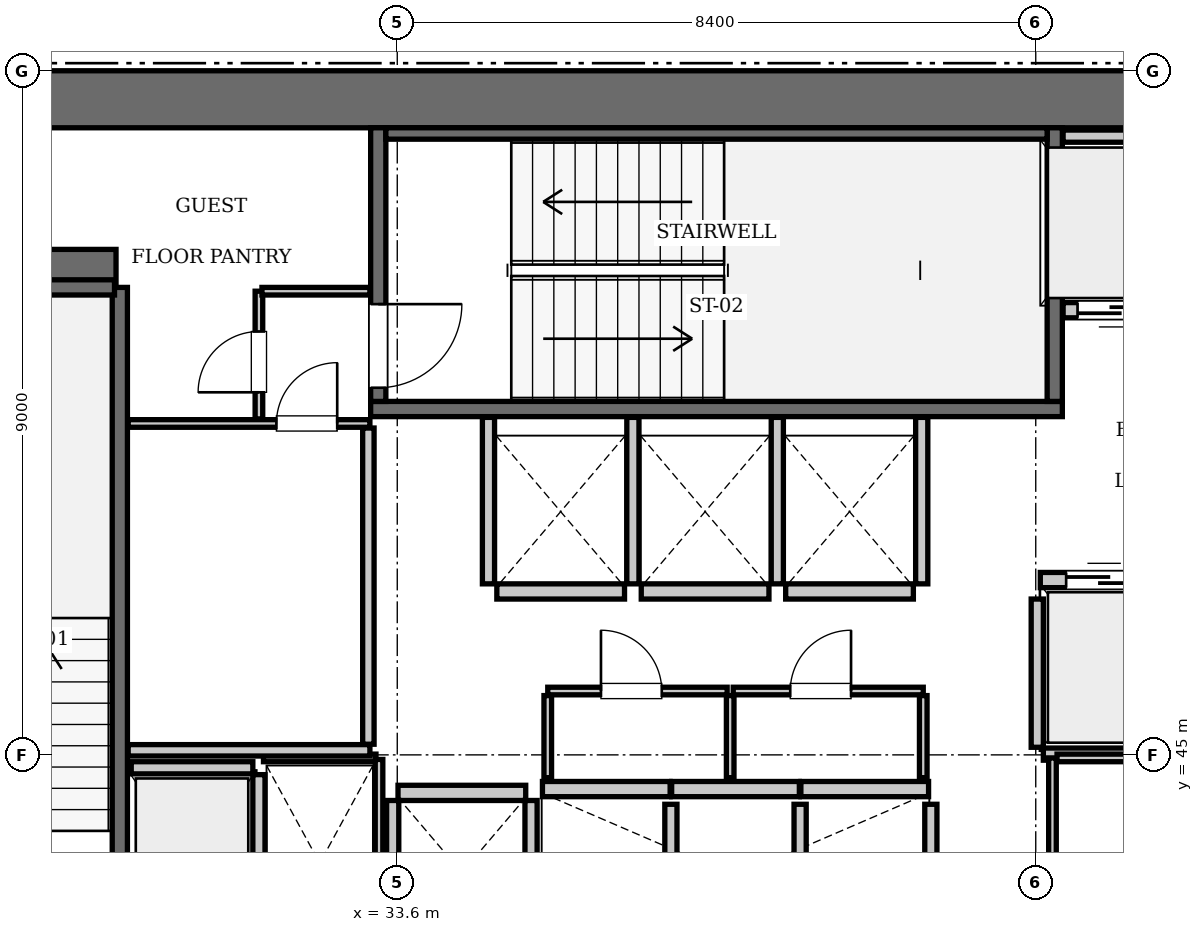
"""IFC4 building model, lengths in metres.
Left out: names, types, materials, properties, quantities, classifications, styles, units other than length and angle.
Written with IfcOpenShell. Run it as: python <this file> out.ifc"""

import sys

from ifc_helpers import new_model, si_unit, direction, frame, frame_2d, origin, place, context, subcontext, project, spatial, rectangle, extrude, element, fill, save


model = new_model("IFC4")
c1 = context("Model", 3, precision=1e-05, world=origin(), true_north=direction((0.0, 1.0)))
c2 = subcontext(c1, "Body", "Model", "MODEL_VIEW")
j1 = project(units=[si_unit("LENGTHUNIT", "METRE"), si_unit("PLANEANGLEUNIT", "RADIAN")], contexts=[c1])
p1 = place(None, origin())
s1 = spatial("IfcSite", under=j1, at=p1, CompositionType="ELEMENT")
p2 = place(p1, origin())
s2 = spatial("IfcBuilding", under=s1, at=p2, CompositionType="ELEMENT")
p3 = place(p2, frame((0.0, 0.0, 204.4)))
s3 = spatial("IfcBuildingStorey", under=s2, at=p3, CompositionType="ELEMENT", Elevation=204.4)
p4 = place(p3, frame((25.2, 53.625, 0.0), z_axis=(0.0, 0.0, 1.0), x_axis=(1.0, 0.0, 0.0)))
e1 = element("IfcWall", 1, at=p4, inside=s3, PredefinedType="SHEAR", context=c2, shape_type="SweptSolid", body=[
    extrude(rectangle(XDim=25.2, YDim=0.75, at=frame_2d((12.6, 0.0))), origin(), (0.0, 0.0, 1.0), 3.85),
])
p5 = place(p3, frame((25.95, 51.4, 0.0), z_axis=(0.0, 0.0, 1.0), x_axis=(1.0, 0.0, 0.0)))
e2 = element("IfcWall", 2, at=p5, inside=s3, PredefinedType="SHEAR", context=c2, shape_type="SweptSolid", body=[
    extrude(rectangle(XDim=3.95, YDim=0.5, at=frame_2d((1.975, 0.0))), origin(), (0.0, 0.0, 1.0), 3.85),
])
p6 = place(p3, frame((29.95, 42.15, 0.0), z_axis=(0.0, 0.0, 1.0), x_axis=(0.0, 1.0, 0.0)))
e3 = element("IfcWall", 3, at=p6, inside=s3, PredefinedType="SOLIDWALL", context=c2, shape_type="SweptSolid", body=[
    extrude(rectangle(XDim=9.0, YDim=0.2, at=frame_2d((4.5, 0.0))), origin(), (0.0, 0.0, 1.0), 3.61),
])
p7 = place(p3, frame((26.38, 51.15, 0.0), z_axis=(0.0, 0.0, 1.0), x_axis=(1.0, 0.0, 0.0)))
e4 = element("IfcWall", 4, at=p7, inside=s3, PredefinedType="SOLIDWALL", context=c2, shape_type="SweptSolid", body=[
    extrude(rectangle(XDim=3.5, YDim=0.2, at=frame_2d((1.75, 0.0))), origin(), (0.0, 0.0, 1.0), 3.61),
])
p8 = place(p3, frame((33.25, 49.55, 0.0), z_axis=(0.0, 0.0, 1.0), x_axis=(1.0, 0.0, 0.0)))
e5 = element("IfcWall", 5, at=p8, inside=s3, PredefinedType="SOLIDWALL", context=c2, shape_type="SweptSolid", body=[
    extrude(rectangle(XDim=9.1, YDim=0.2, at=frame_2d((4.55, 0.0))), origin(), (0.0, 0.0, 1.0), 3.61),
])
p9 = place(p3, frame((42.25, 49.65, 0.0), z_axis=(0.0, 0.0, 1.0), x_axis=(0.0, 1.0, 0.0)))
e6 = element("IfcWall", 6, at=p9, inside=s3, PredefinedType="SOLIDWALL", context=c2, shape_type="SweptSolid", body=[
    extrude(rectangle(XDim=3.6, YDim=0.2, at=frame_2d((1.8, 0.0))), origin(), (0.0, 0.0, 1.0), 3.61),
])
p10 = place(p3, frame((33.35, 49.65, 0.0), z_axis=(0.0, 0.0, 1.0), x_axis=(0.0, 1.0, 0.0)))
e7 = element("IfcWall", 7, at=p10, inside=s3, PredefinedType="SOLIDWALL", context=c2, shape_type="SweptSolid", body=[
    extrude(rectangle(XDim=3.6, YDim=0.2, at=frame_2d((1.8, 0.0))), origin(), (0.0, 0.0, 1.0), 3.61),
])
p11 = place(p10, frame((0.18, 0.0, 0.0)))
e8 = element("IfcOpeningElement", 8, at=p11, cuts=e7, PredefinedType="OPENING", context=c2, shape_type="SweptSolid", body=[
    extrude(rectangle(XDim=1.1, YDim=2.15, at=frame_2d((0.55, 1.075))), frame((0.0, 0.11, 0.0), z_axis=(0.0, -1.0, 0.0), x_axis=(1.0, 0.0, 0.0)), (0.0, 0.0, 1.0), 0.22),
])
p12 = place(p3, frame((33.45, 53.175, 0.0), z_axis=(0.0, 0.0, 1.0), x_axis=(1.0, 0.0, 0.0)))
e9 = element("IfcWall", 9, at=p12, inside=s3, PredefinedType="SOLIDWALL", context=c2, shape_type="SweptSolid", body=[
    extrude(rectangle(XDim=8.7, YDim=0.15, at=frame_2d((4.35, 0.0))), origin(), (0.0, 0.0, 1.0), 3.61),
])
p13 = place(p3, frame((42.06, 47.3, 0.0), z_axis=(0.0, 0.0, 1.0), x_axis=(1.0, 0.0, 0.0)))
e10 = element("IfcWall", 10, at=p13, inside=s3, PredefinedType="SOLIDWALL", context=c2, shape_type="SweptSolid", body=[
    extrude(rectangle(XDim=1.68, YDim=0.2, at=frame_2d((0.84, 0.0))), origin(), (0.0, 0.0, 1.0), 3.61),
])
p14 = place(p13, frame((0.34, 0.0, 0.0)))
e11 = element("IfcOpeningElement", 11, at=p14, cuts=e10, PredefinedType="OPENING", context=c2, shape_type="SweptSolid", body=[
    extrude(rectangle(XDim=1.0, YDim=2.15, at=frame_2d((0.5, 1.075))), frame((0.0, 0.11, 0.0), z_axis=(0.0, -1.0, 0.0), x_axis=(1.0, 0.0, 0.0)), (0.0, 0.0, 1.0), 0.22),
])
p15 = place(p3, frame((42.36, 50.85, 0.0), z_axis=(0.0, 0.0, 1.0), x_axis=(1.0, 0.0, 0.0)))
e12 = element("IfcWall", 12, at=p15, inside=s3, PredefinedType="SOLIDWALL", context=c2, shape_type="SweptSolid", body=[
    extrude(rectangle(XDim=1.38, YDim=0.2, at=frame_2d((0.69, 0.0))), origin(), (0.0, 0.0, 1.0), 3.61),
])
p16 = place(p15, frame((0.19, 0.0, 0.0)))
e13 = element("IfcOpeningElement", 13, at=p16, cuts=e12, PredefinedType="OPENING", context=c2, shape_type="SweptSolid", body=[
    extrude(rectangle(XDim=1.0, YDim=2.15, at=frame_2d((0.5, 1.075))), frame((0.0, 0.11, 0.0), z_axis=(0.0, -1.0, 0.0), x_axis=(1.0, 0.0, 0.0)), (0.0, 0.0, 1.0), 0.22),
])
for number, where, z_axis, x_axis in (
    (14, (35.51, 44.55, 0.0), (0.0, 0.0, 1.0), (1.0, 0.0, 0.0)),
    (15, (37.21, 44.55, 0.0), (0.0, 0.0, 1.0), (1.0, 0.0, 0.0)),
):
    element("IfcWall", number, at=place(p3, frame(where, z_axis=z_axis, x_axis=x_axis)), inside=s3, PredefinedType="SOLIDWALL", context=c2, shape_type="SweptSolid", body=[
        extrude(rectangle(XDim=1.68, YDim=0.2, at=frame_2d((0.84, 0.0))), origin(), (0.0, 0.0, 1.0), 3.61),
    ])
for number, where, z_axis, x_axis in (
    (16, (38.91, 44.55, 0.0), (0.0, 0.0, 1.0), (1.0, 0.0, 0.0)),
    (17, (34.91, 47.15, 0.0), (0.0, 0.0, 1.0), (1.0, 0.0, 0.0)),
):
    element("IfcWall", number, at=place(p3, frame(where, z_axis=z_axis, x_axis=x_axis)), inside=s3, PredefinedType="SOLIDWALL", context=c2, shape_type="SweptSolid", body=[
        extrude(rectangle(XDim=1.68, YDim=0.2, at=frame_2d((0.84, 0.0))), origin(), (0.0, 0.0, 1.0), 3.61),
    ])
for number, where, z_axis, x_axis in (
    (18, (36.81, 47.15, 0.0), (0.0, 0.0, 1.0), (1.0, 0.0, 0.0)),
    (19, (38.71, 47.15, 0.0), (0.0, 0.0, 1.0), (1.0, 0.0, 0.0)),
    (20, (33.61, 44.5, 0.0), (0.0, 0.0, 1.0), (1.0, 0.0, 0.0)),
):
    element("IfcWall", number, at=place(p3, frame(where, z_axis=z_axis, x_axis=x_axis)), inside=s3, PredefinedType="SOLIDWALL", context=c2, shape_type="SweptSolid", body=[
        extrude(rectangle(XDim=1.68, YDim=0.2, at=frame_2d((0.84, 0.0))), origin(), (0.0, 0.0, 1.0), 3.61),
    ])
p17 = place(p3, frame((30.1, 44.83, 0.0), z_axis=(0.0, 0.0, 1.0), x_axis=(1.0, 0.0, 0.0)))
e21 = element("IfcWall", 21, at=p17, inside=s3, PredefinedType="SOLIDWALL", context=c2, shape_type="SweptSolid", body=[
    extrude(rectangle(XDim=1.6, YDim=0.16, at=frame_2d((0.8, 0.0))), origin(), (0.0, 0.0, 1.0), 3.61),
])
p18 = place(p3, frame((31.78, 42.15, 0.0), z_axis=(0.0, 0.0, 1.0), x_axis=(0.0, 1.0, 0.0)))
e22 = element("IfcWall", 22, at=p18, inside=s3, PredefinedType="SOLIDWALL", context=c2, shape_type="SweptSolid", body=[
    extrude(rectangle(XDim=2.59, YDim=0.16, at=frame_2d((1.295, 0.0))), origin(), (0.0, 0.0, 1.0), 3.61),
])
p19 = place(p3, frame((42.02, 45.1, 0.0), z_axis=(0.0, 0.0, 1.0), x_axis=(0.0, 1.0, 0.0)))
e23 = element("IfcWall", 23, at=p19, inside=s3, PredefinedType="SOLIDWALL", context=c2, shape_type="SweptSolid", body=[
    extrude(rectangle(XDim=1.95, YDim=0.16, at=frame_2d((0.975, 0.0))), origin(), (0.0, 0.0, 1.0), 3.61),
])
p20 = place(p3, frame((42.1, 45.01, 0.0), z_axis=(0.0, 0.0, 1.0), x_axis=(1.0, 0.0, 0.0)))
e24 = element("IfcWall", 24, at=p20, inside=s3, PredefinedType="SOLIDWALL", context=c2, shape_type="SweptSolid", body=[
    extrude(rectangle(XDim=3.45, YDim=0.16, at=frame_2d((1.725, 0.0))), origin(), (0.0, 0.0, 1.0), 3.61),
])
p21 = place(p3, frame((42.36, 53.14, 0.0), z_axis=(0.0, 0.0, 1.0), x_axis=(1.0, 0.0, 0.0)))
e25 = element("IfcWall", 25, at=p21, inside=s3, PredefinedType="SOLIDWALL", context=c2, shape_type="SweptSolid", body=[
    extrude(rectangle(XDim=3.14, YDim=0.16, at=frame_2d((1.57, 0.0))), origin(), (0.0, 0.0, 1.0), 3.61),
])
for number, where, z_axis, x_axis in (
    (26, (37.2, 42.15, 0.0), (0.0, 0.0, 1.0), (0.0, 1.0, 0.0)),
    (27, (38.9, 42.15, 0.0), (0.0, 0.0, 1.0), (0.0, 1.0, 0.0)),
    (28, (40.62, 42.15, 0.0), (0.0, 0.0, 1.0), (0.0, 1.0, 0.0)),
):
    element("IfcWall", number, at=place(p3, frame(where, z_axis=z_axis, x_axis=x_axis)), inside=s3, PredefinedType="SOLIDWALL", context=c2, shape_type="SweptSolid", body=[
        extrude(rectangle(XDim=2.2, YDim=0.16, at=frame_2d((1.1, 0.0))), origin(), (0.0, 0.0, 1.0), 3.61),
    ])
for number, where, z_axis, x_axis in (
    (29, (34.8, 47.25, 0.0), (0.0, 0.0, 1.0), (0.0, 1.0, 0.0)),
    (30, (36.7, 47.25, 0.0), (0.0, 0.0, 1.0), (0.0, 1.0, 0.0)),
    (31, (38.6, 47.25, 0.0), (0.0, 0.0, 1.0), (0.0, 1.0, 0.0)),
    (32, (40.5, 47.25, 0.0), (0.0, 0.0, 1.0), (0.0, 1.0, 0.0)),
):
    element("IfcWall", number, at=place(p3, frame(where, z_axis=z_axis, x_axis=x_axis)), inside=s3, PredefinedType="SOLIDWALL", context=c2, shape_type="SweptSolid", body=[
        extrude(rectangle(XDim=2.19, YDim=0.16, at=frame_2d((1.095, 0.0))), origin(), (0.0, 0.0, 1.0), 3.61),
    ])
for number, where, z_axis, x_axis in (
    (33, (33.54, 42.15, 0.0), (0.0, 0.0, 1.0), (0.0, 1.0, 0.0)),
    (34, (35.36, 42.15, 0.0), (0.0, 0.0, 1.0), (0.0, 1.0, 0.0)),
):
    element("IfcWall", number, at=place(p3, frame(where, z_axis=z_axis, x_axis=x_axis)), inside=s3, PredefinedType="SOLIDWALL", context=c2, shape_type="SweptSolid", body=[
        extrude(rectangle(XDim=2.25, YDim=0.16, at=frame_2d((1.125, 0.0))), origin(), (0.0, 0.0, 1.0), 3.61),
    ])
p22 = place(p3, frame((31.84, 44.96, 0.0), z_axis=(0.0, 0.0, 1.0), x_axis=(1.0, 0.0, 0.0)))
e35 = element("IfcWall", 35, at=p22, inside=s3, PredefinedType="PARTITIONING", context=c2, shape_type="SweptSolid", body=[
    extrude(rectangle(XDim=1.48, YDim=0.1, at=frame_2d((0.74, 0.0))), origin(), (0.0, 0.0, 1.0), 3.61),
])
p23 = place(p3, frame((33.36, 42.21, 0.0), z_axis=(0.0, 0.0, 1.0), x_axis=(0.0, 1.0, 0.0)))
e36 = element("IfcWall", 36, at=p23, inside=s3, PredefinedType="PARTITIONING", context=c2, shape_type="SweptSolid", body=[
    extrude(rectangle(XDim=2.73, YDim=0.1, at=frame_2d((1.365, 0.0))), origin(), (0.0, 0.0, 1.0), 3.61),
])
p24 = place(p3, frame((35.58, 45.84, 0.0), z_axis=(0.0, 0.0, 1.0), x_axis=(1.0, 0.0, 0.0)))
e37 = element("IfcWall", 37, at=p24, inside=s3, PredefinedType="PARTITIONING", context=c2, shape_type="SweptSolid", body=[
    extrude(rectangle(XDim=2.36, YDim=0.1, at=frame_2d((1.18, 0.0))), origin(), (0.0, 0.0, 1.0), 3.61),
])
p25 = place(p24, frame((0.7, 0.0, 0.0)))
e38 = element("IfcOpeningElement", 38, at=p25, cuts=e37, PredefinedType="OPENING", context=c2, shape_type="SweptSolid", body=[
    extrude(rectangle(XDim=0.8, YDim=2.05, at=frame_2d((0.4, 1.025))), frame((0.0, 0.06, 0.0), z_axis=(0.0, -1.0, 0.0), x_axis=(1.0, 0.0, 0.0)), (0.0, 0.0, 1.0), 0.12),
])
p26 = place(p3, frame((38.02, 45.84, 0.0), z_axis=(0.0, 0.0, 1.0), x_axis=(1.0, 0.0, 0.0)))
e39 = element("IfcWall", 39, at=p26, inside=s3, PredefinedType="PARTITIONING", context=c2, shape_type="SweptSolid", body=[
    extrude(rectangle(XDim=2.5, YDim=0.1, at=frame_2d((1.25, 0.0))), origin(), (0.0, 0.0, 1.0), 3.61),
])
p27 = place(p26, frame((0.75, 0.0, 0.0)))
e40 = element("IfcOpeningElement", 40, at=p27, cuts=e39, PredefinedType="OPENING", context=c2, shape_type="SweptSolid", body=[
    extrude(rectangle(XDim=0.8, YDim=2.05, at=frame_2d((0.4, 1.025))), frame((0.0, 0.06, 0.0), z_axis=(0.0, -1.0, 0.0), x_axis=(1.0, 0.0, 0.0)), (0.0, 0.0, 1.0), 0.12),
])
for number, where, z_axis, x_axis in (
    (41, (35.58, 44.7, 0.0), (0.0, 0.0, 1.0), (0.0, 1.0, 0.0)),
    (42, (37.98, 44.7, 0.0), (0.0, 0.0, 1.0), (0.0, 1.0, 0.0)),
    (43, (40.52, 44.7, 0.0), (0.0, 0.0, 1.0), (0.0, 1.0, 0.0)),
):
    element("IfcWall", number, at=place(p3, frame(where, z_axis=z_axis, x_axis=x_axis)), inside=s3, PredefinedType="PARTITIONING", context=c2, shape_type="SweptSolid", body=[
        extrude(rectangle(XDim=1.08, YDim=0.1, at=frame_2d((0.54, 0.0))), origin(), (0.0, 0.0, 1.0), 3.61),
    ])
p28 = place(p3, frame((42.22, 42.2, 0.0), z_axis=(0.0, 0.0, 1.0), x_axis=(0.0, 1.0, 0.0)))
e44 = element("IfcWall", 44, at=p28, inside=s3, PredefinedType="PARTITIONING", context=c2, shape_type="SweptSolid", body=[
    extrude(rectangle(XDim=2.76, YDim=0.1, at=frame_2d((1.38, 0.0))), origin(), (0.0, 0.0, 1.0), 3.61),
])
p29 = place(p28, frame((0.65, 0.0, 0.0)))
e45 = element("IfcOpeningElement", 45, at=p29, cuts=e44, PredefinedType="OPENING", context=c2, shape_type="SweptSolid", body=[
    extrude(rectangle(XDim=0.8, YDim=2.05, at=frame_2d((0.4, 1.025))), frame((0.0, 0.06, 0.0), z_axis=(0.0, -1.0, 0.0), x_axis=(1.0, 0.0, 0.0)), (0.0, 0.0, 1.0), 0.12),
])
p30 = place(p3, frame((42.28, 44.96, 0.0), z_axis=(0.0, 0.0, 1.0), x_axis=(1.0, 0.0, 0.0)))
e46 = element("IfcWall", 46, at=p30, inside=s3, PredefinedType="PARTITIONING", context=c2, shape_type="SweptSolid", body=[
    extrude(rectangle(XDim=1.3, YDim=0.1, at=frame_2d((0.65, 0.0))), origin(), (0.0, 0.0, 1.0), 3.61),
])
p31 = place(p3, frame((30.06, 45.06, 0.0), z_axis=(0.0, 0.0, 1.0), x_axis=(1.0, 0.0, 0.0)))
e47 = element("IfcWall", 47, at=p31, inside=s3, PredefinedType="PARTITIONING", context=c2, shape_type="SweptSolid", body=[
    extrude(rectangle(XDim=3.18, YDim=0.15, at=frame_2d((1.59, 0.0))), origin(), (0.0, 0.0, 1.0), 3.61),
])
p32 = place(p3, frame((33.22, 45.14, 0.0), z_axis=(0.0, 0.0, 1.0), x_axis=(0.0, 1.0, 0.0)))
e48 = element("IfcWall", 48, at=p32, inside=s3, PredefinedType="PARTITIONING", context=c2, shape_type="SweptSolid", body=[
    extrude(rectangle(XDim=4.16, YDim=0.15, at=frame_2d((2.08, 0.0))), origin(), (0.0, 0.0, 1.0), 3.61),
])
p33 = place(p3, frame((30.06, 49.36, 0.0), z_axis=(0.0, 0.0, 1.0), x_axis=(1.0, 0.0, 0.0)))
e49 = element("IfcWall", 49, at=p33, inside=s3, PredefinedType="PARTITIONING", context=c2, shape_type="SweptSolid", body=[
    extrude(rectangle(XDim=3.18, YDim=0.1, at=frame_2d((1.59, 0.0))), origin(), (0.0, 0.0, 1.0), 3.61),
])
p34 = place(p33, frame((1.95, 0.0, 0.0)))
e50 = element("IfcOpeningElement", 50, at=p34, cuts=e49, PredefinedType="OPENING", context=c2, shape_type="SweptSolid", body=[
    extrude(rectangle(XDim=0.8, YDim=2.05, at=frame_2d((0.4, 1.025))), frame((0.0, 0.06, 0.0), z_axis=(0.0, -1.0, 0.0), x_axis=(1.0, 0.0, 0.0)), (0.0, 0.0, 1.0), 0.12),
])
p35 = place(p3, frame((31.78, 49.42, 0.0), z_axis=(0.0, 0.0, 1.0), x_axis=(0.0, 1.0, 0.0)))
e51 = element("IfcWall", 51, at=p35, inside=s3, PredefinedType="PARTITIONING", context=c2, shape_type="SweptSolid", body=[
    extrude(rectangle(XDim=1.68, YDim=0.1, at=frame_2d((0.84, 0.0))), origin(), (0.0, 0.0, 1.0), 3.61),
])
p36 = place(p35, frame((0.35, 0.0, 0.0)))
e52 = element("IfcOpeningElement", 52, at=p36, cuts=e51, PredefinedType="OPENING", context=c2, shape_type="SweptSolid", body=[
    extrude(rectangle(XDim=0.8, YDim=2.05, at=frame_2d((0.4, 1.025))), frame((0.0, 0.06, 0.0), z_axis=(0.0, -1.0, 0.0), x_axis=(1.0, 0.0, 0.0)), (0.0, 0.0, 1.0), 0.12),
])
p37 = place(p3, frame((31.82, 51.1, 0.0), z_axis=(0.0, 0.0, 1.0), x_axis=(1.0, 0.0, 0.0)))
e53 = element("IfcWall", 53, at=p37, inside=s3, PredefinedType="PARTITIONING", context=c2, shape_type="SweptSolid", body=[
    extrude(rectangle(XDim=1.42, YDim=0.1, at=frame_2d((0.71, 0.0))), origin(), (0.0, 0.0, 1.0), 3.61),
])
p38 = place(p11, frame((1.1, 0.0, 0.0), z_axis=(0.0, 0.0, 1.0), x_axis=(-1.0, 0.0, 0.0)))
e54 = element("IfcDoor", 54, at=p38, inside=s3, OperationType="SINGLE_SWING_LEFT", PredefinedType="DOOR", context=c2, shape_type="SweptSolid", body=[
    extrude(rectangle(XDim=1.1, YDim=2.15, at=frame_2d((0.55, 1.075))), frame((0.0, 0.025, 0.0), z_axis=(0.0, -1.0, 0.0), x_axis=(1.0, 0.0, 0.0)), (0.0, 0.0, 1.0), 0.05),
])
fill(e8, e54)
p39 = place(p14, origin())
e55 = element("IfcDoor", 55, at=p39, inside=s3, OperationType="SLIDING_TO_LEFT", PredefinedType="DOOR", context=c2, shape_type="SweptSolid", body=[
    extrude(rectangle(XDim=1.0, YDim=2.15, at=frame_2d((0.5, 1.075))), frame((0.0, 0.025, 0.0), z_axis=(0.0, -1.0, 0.0), x_axis=(1.0, 0.0, 0.0)), (0.0, 0.0, 1.0), 0.05),
])
fill(e11, e55)
p40 = place(p16, frame((1.0, 0.0, 0.0), z_axis=(0.0, 0.0, 1.0), x_axis=(-1.0, 0.0, 0.0)))
e56 = element("IfcDoor", 56, at=p40, inside=s3, OperationType="SLIDING_TO_LEFT", PredefinedType="DOOR", context=c2, shape_type="SweptSolid", body=[
    extrude(rectangle(XDim=1.0, YDim=2.15, at=frame_2d((0.5, 1.075))), frame((0.0, 0.025, 0.0), z_axis=(0.0, -1.0, 0.0), x_axis=(1.0, 0.0, 0.0)), (0.0, 0.0, 1.0), 0.05),
])
fill(e13, e56)
p41 = place(p25, origin())
e57 = element("IfcDoor", 57, at=p41, inside=s3, OperationType="SINGLE_SWING_LEFT", PredefinedType="DOOR", context=c2, shape_type="SweptSolid", body=[
    extrude(rectangle(XDim=0.8, YDim=2.05, at=frame_2d((0.4, 1.025))), frame((0.0, 0.025, 0.0), z_axis=(0.0, -1.0, 0.0), x_axis=(1.0, 0.0, 0.0)), (0.0, 0.0, 1.0), 0.05),
])
fill(e38, e57)
p42 = place(p27, origin())
e58 = element("IfcDoor", 58, at=p42, inside=s3, OperationType="SINGLE_SWING_RIGHT", PredefinedType="DOOR", context=c2, shape_type="SweptSolid", body=[
    extrude(rectangle(XDim=0.8, YDim=2.05, at=frame_2d((0.4, 1.025))), frame((0.0, 0.025, 0.0), z_axis=(0.0, -1.0, 0.0), x_axis=(1.0, 0.0, 0.0)), (0.0, 0.0, 1.0), 0.05),
])
fill(e40, e58)
p43 = place(p34, origin())
e59 = element("IfcDoor", 59, at=p43, inside=s3, OperationType="SINGLE_SWING_RIGHT", PredefinedType="DOOR", context=c2, shape_type="SweptSolid", body=[
    extrude(rectangle(XDim=0.8, YDim=2.05, at=frame_2d((0.4, 1.025))), frame((0.0, 0.025, 0.0), z_axis=(0.0, -1.0, 0.0), x_axis=(1.0, 0.0, 0.0)), (0.0, 0.0, 1.0), 0.05),
])
fill(e50, e59)
p44 = place(p36, origin())
e60 = element("IfcDoor", 60, at=p44, inside=s3, OperationType="SINGLE_SWING_LEFT", PredefinedType="DOOR", context=c2, shape_type="SweptSolid", body=[
    extrude(rectangle(XDim=0.8, YDim=2.05, at=frame_2d((0.4, 1.025))), frame((0.0, 0.025, 0.0), z_axis=(0.0, -1.0, 0.0), x_axis=(1.0, 0.0, 0.0)), (0.0, 0.0, 1.0), 0.05),
])
fill(e52, e60)
save(model, sys.argv[1])
